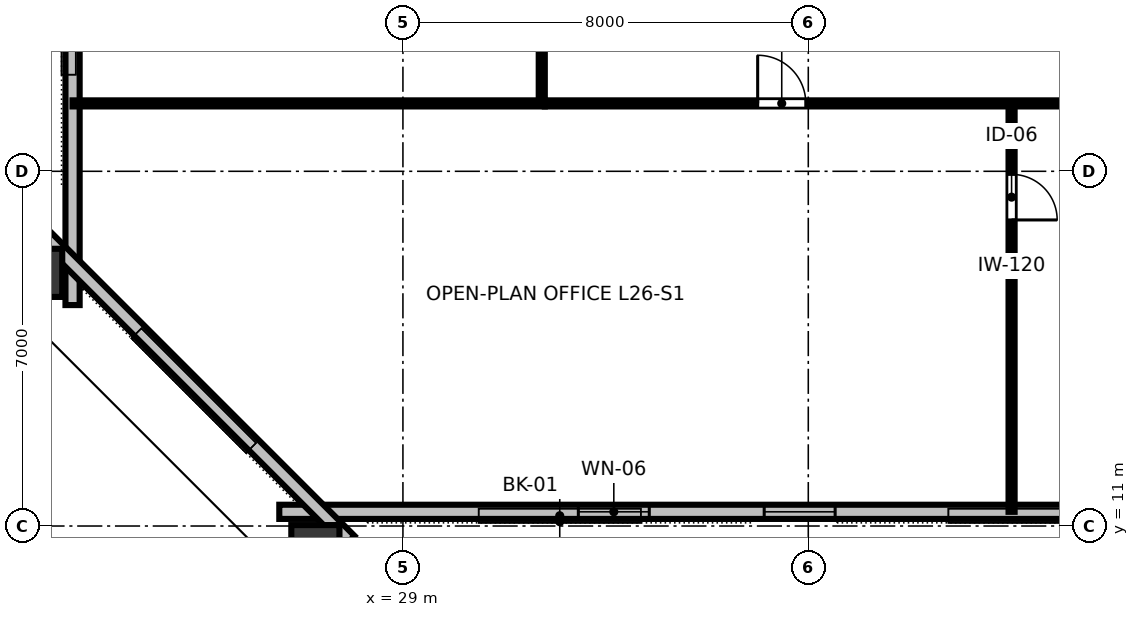
"""IFC4 building model, lengths in metres.
Left out: names, types, materials, properties, quantities, classifications, styles, units other than length and angle.
Written with IfcOpenShell. Run it as: python <this file> out.ifc"""

import sys

from ifc_helpers import new_model, si_unit, direction, frame, frame_2d, origin, origin_2d, place, context, subcontext, project, spatial, rectangle, hollow_rectangle, extrude, element, fill, save


model = new_model("IFC4")
c1 = context("Model", 3, precision=1e-05, world=origin(), true_north=direction((0.0, 1.0)))
c2 = subcontext(c1, "Body", "Model", "MODEL_VIEW")
j1 = project(units=[si_unit("LENGTHUNIT", "METRE"), si_unit("PLANEANGLEUNIT", "RADIAN")], contexts=[c1])
p1 = place(None, origin())
s1 = spatial("IfcSite", under=j1, at=p1, CompositionType="ELEMENT")
p2 = place(p1, origin())
s2 = spatial("IfcBuilding", under=s1, at=p2, CompositionType="ELEMENT")
p3 = place(p2, frame((0.0, 0.0, 102.4)))
s3 = spatial("IfcBuildingStorey", under=s2, at=p3, CompositionType="ELEMENT", Elevation=102.4)
p4 = place(p3, frame((27.272, 10.444, 0.0), z_axis=(0.227502922189, 0.158490675606, 0.960792967367), x_axis=(-0.571617951621, 0.820519906757, 0.0)))
e1 = element("IfcColumn", 1, at=p4, inside=s3, PredefinedType="COLUMN", context=c2, shape_type="SweptSolid", body=[
    extrude(hollow_rectangle(XDim=0.95, YDim=1.15, WallThickness=0.06, at=origin_2d()), origin(), (0.0, 0.0, 1.0), 3.495),
])
p5 = place(p3, frame((21.701, 15.996, 0.0), z_axis=(0.187073570433, 0.199172160222, 0.961942789275), x_axis=(-0.658567101109, -0.701158543536, 0.273250928932)))
e2 = element("IfcColumn", 2, at=p5, inside=s3, PredefinedType="COLUMN", context=c2, shape_type="SweptSolid", body=[
    extrude(hollow_rectangle(XDim=0.95, YDim=1.15, WallThickness=0.06, at=origin_2d()), origin(), (0.0, 0.0, 1.0), 3.491),
])
p6 = place(p3, frame((26.56, 11.28, 0.0), z_axis=(0.0, 0.0, 1.0), x_axis=(1.0, 0.0, 0.0)))
e3 = element("IfcWall", 3, at=p6, inside=s3, PredefinedType="STANDARD", context=c2, shape_type="SweptSolid", body=[
    extrude(rectangle(XDim=38.88, YDim=0.28, at=frame_2d((19.44, 0.0))), origin(), (0.0, 0.0, 1.0), 2.662),
])
p7 = place(p6, frame((5.902, 0.0, 0.85)))
e4 = element("IfcOpeningElement", 4, at=p7, cuts=e3, PredefinedType="OPENING", context=c2, shape_type="SweptSolid", body=[
    extrude(rectangle(XDim=1.4, YDim=1.2, at=frame_2d((0.7, 0.6))), frame((0.0, 0.15, 0.0), z_axis=(0.0, -1.0, 0.0), x_axis=(1.0, 0.0, 0.0)), (0.0, 0.0, 1.0), 0.3),
])
p8 = place(p6, frame((9.57, 0.0, 0.85)))
e5 = element("IfcOpeningElement", 5, at=p8, cuts=e3, PredefinedType="OPENING", context=c2, shape_type="SweptSolid", body=[
    extrude(rectangle(XDim=1.4, YDim=1.2, at=frame_2d((0.7, 0.6))), frame((0.0, 0.15, 0.0), z_axis=(0.0, -1.0, 0.0), x_axis=(1.0, 0.0, 0.0)), (0.0, 0.0, 1.0), 0.3),
])
p9 = place(p6, frame((16.906, 0.0, 0.85)))
e6 = element("IfcOpeningElement", 6, at=p9, cuts=e3, PredefinedType="OPENING", context=c2, shape_type="SweptSolid", body=[
    extrude(rectangle(XDim=1.4, YDim=1.2, at=frame_2d((0.7, 0.6))), frame((0.0, 0.15, 0.0), z_axis=(0.0, -1.0, 0.0), x_axis=(1.0, 0.0, 0.0)), (0.0, 0.0, 1.0), 0.3),
])
p10 = place(p6, frame((20.574, 0.0, 0.85)))
e7 = element("IfcOpeningElement", 7, at=p10, cuts=e3, PredefinedType="OPENING", context=c2, shape_type="SweptSolid", body=[
    extrude(rectangle(XDim=1.4, YDim=1.2, at=frame_2d((0.7, 0.6))), frame((0.0, 0.15, 0.0), z_axis=(0.0, -1.0, 0.0), x_axis=(1.0, 0.0, 0.0)), (0.0, 0.0, 1.0), 0.3),
])
p11 = place(p6, frame((24.242, 0.0, 0.85)))
e8 = element("IfcOpeningElement", 8, at=p11, cuts=e3, PredefinedType="OPENING", context=c2, shape_type="SweptSolid", body=[
    extrude(rectangle(XDim=1.4, YDim=1.2, at=frame_2d((0.7, 0.6))), frame((0.0, 0.15, 0.0), z_axis=(0.0, -1.0, 0.0), x_axis=(1.0, 0.0, 0.0)), (0.0, 0.0, 1.0), 0.3),
])
p12 = place(p6, frame((27.91, 0.0, 0.85)))
e9 = element("IfcOpeningElement", 9, at=p12, cuts=e3, PredefinedType="OPENING", context=c2, shape_type="SweptSolid", body=[
    extrude(rectangle(XDim=1.4, YDim=1.2, at=frame_2d((0.7, 0.6))), frame((0.0, 0.15, 0.0), z_axis=(0.0, -1.0, 0.0), x_axis=(1.0, 0.0, 0.0)), (0.0, 0.0, 1.0), 0.3),
])
p13 = place(p6, frame((31.578, 0.0, 0.85)))
e10 = element("IfcOpeningElement", 10, at=p13, cuts=e3, PredefinedType="OPENING", context=c2, shape_type="SweptSolid", body=[
    extrude(rectangle(XDim=1.4, YDim=1.2, at=frame_2d((0.7, 0.6))), frame((0.0, 0.15, 0.0), z_axis=(0.0, -1.0, 0.0), x_axis=(1.0, 0.0, 0.0)), (0.0, 0.0, 1.0), 0.3),
])
p14 = place(p3, frame((22.48, 48.64, 0.0), z_axis=(0.0, 0.0, 1.0), x_axis=(0.0, -1.0, 0.0)))
e11 = element("IfcWall", 11, at=p14, inside=s3, PredefinedType="STANDARD", context=c2, shape_type="SweptSolid", body=[
    extrude(rectangle(XDim=33.28, YDim=0.28, at=frame_2d((16.64, 0.0))), origin(), (0.0, 0.0, 1.0), 2.662),
])
p15 = place(p14, frame((6.228, 0.0, 0.85)))
e12 = element("IfcOpeningElement", 12, at=p15, cuts=e11, PredefinedType="OPENING", context=c2, shape_type="SweptSolid", body=[
    extrude(rectangle(XDim=1.4, YDim=1.2, at=frame_2d((0.7, 0.6))), frame((0.0, 0.15, 0.0), z_axis=(0.0, -1.0, 0.0), x_axis=(1.0, 0.0, 0.0)), (0.0, 0.0, 1.0), 0.3),
])
p16 = place(p14, frame((10.113, 0.0, 0.85)))
e13 = element("IfcOpeningElement", 13, at=p16, cuts=e11, PredefinedType="OPENING", context=c2, shape_type="SweptSolid", body=[
    extrude(rectangle(XDim=1.4, YDim=1.2, at=frame_2d((0.7, 0.6))), frame((0.0, 0.15, 0.0), z_axis=(0.0, -1.0, 0.0), x_axis=(1.0, 0.0, 0.0)), (0.0, 0.0, 1.0), 0.3),
])
p17 = place(p14, frame((13.998, 0.0, 0.85)))
e14 = element("IfcOpeningElement", 14, at=p17, cuts=e11, PredefinedType="OPENING", context=c2, shape_type="SweptSolid", body=[
    extrude(rectangle(XDim=1.4, YDim=1.2, at=frame_2d((0.7, 0.6))), frame((0.0, 0.15, 0.0), z_axis=(0.0, -1.0, 0.0), x_axis=(1.0, 0.0, 0.0)), (0.0, 0.0, 1.0), 0.3),
])
p18 = place(p14, frame((17.883, 0.0, 0.85)))
e15 = element("IfcOpeningElement", 15, at=p18, cuts=e11, PredefinedType="OPENING", context=c2, shape_type="SweptSolid", body=[
    extrude(rectangle(XDim=1.4, YDim=1.2, at=frame_2d((0.7, 0.6))), frame((0.0, 0.15, 0.0), z_axis=(0.0, -1.0, 0.0), x_axis=(1.0, 0.0, 0.0)), (0.0, 0.0, 1.0), 0.3),
])
p19 = place(p14, frame((21.768, 0.0, 0.85)))
e16 = element("IfcOpeningElement", 16, at=p19, cuts=e11, PredefinedType="OPENING", context=c2, shape_type="SweptSolid", body=[
    extrude(rectangle(XDim=1.4, YDim=1.2, at=frame_2d((0.7, 0.6))), frame((0.0, 0.15, 0.0), z_axis=(0.0, -1.0, 0.0), x_axis=(1.0, 0.0, 0.0)), (0.0, 0.0, 1.0), 0.3),
])
p20 = place(p14, frame((25.653, 0.0, 0.85)))
e17 = element("IfcOpeningElement", 17, at=p20, cuts=e11, PredefinedType="OPENING", context=c2, shape_type="SweptSolid", body=[
    extrude(rectangle(XDim=1.4, YDim=1.2, at=frame_2d((0.7, 0.6))), frame((0.0, 0.15, 0.0), z_axis=(0.0, -1.0, 0.0), x_axis=(1.0, 0.0, 0.0)), (0.0, 0.0, 1.0), 0.3),
])
p21 = place(p3, frame((21.906, 16.746, 0.0), z_axis=(0.0, 0.0, 1.0), x_axis=(0.707106781187, -0.707106781187, 0.0)))
e18 = element("IfcWall", 18, at=p21, inside=s3, PredefinedType="STANDARD", context=c2, shape_type="SweptSolid", body=[
    extrude(rectangle(XDim=8.541, YDim=0.28, at=frame_2d((4.271, 0.0))), origin(), (0.0, 0.0, 1.0), 2.662),
])
p22 = place(p3, frame((41.012, 19.34, 0.0), z_axis=(0.0, 0.0, 1.0), x_axis=(0.0, -1.0, 0.0)))
e19 = element("IfcWall", 19, at=p22, inside=s3, PredefinedType="PARTITIONING", context=c2, shape_type="SweptSolid", body=[
    extrude(rectangle(XDim=8.06, YDim=0.12, at=frame_2d((4.03, 0.0))), origin(), (0.0, 0.0, 1.0), 2.64),
])
p23 = place(p22, frame((1.4, 0.0, 0.0)))
e20 = element("IfcOpeningElement", 20, at=p23, cuts=e19, PredefinedType="OPENING", context=c2, shape_type="SweptSolid", body=[
    extrude(rectangle(XDim=0.9, YDim=2.15, at=frame_2d((0.45, 1.075))), frame((0.0, 0.07, 0.0), z_axis=(0.0, -1.0, 0.0), x_axis=(1.0, 0.0, 0.0)), (0.0, 0.0, 1.0), 0.14),
])
p24 = place(p3, frame((31.8, 19.34, 0.0), z_axis=(0.0, 0.0, 1.0), x_axis=(1.0, 0.0, 0.0)))
e21 = element("IfcWall", 21, at=p24, inside=s3, PredefinedType="PARTITIONING", context=c2, shape_type="SweptSolid", body=[
    extrude(rectangle(XDim=28.4, YDim=0.12, at=frame_2d((14.2, 0.0))), origin(), (0.0, 0.0, 1.0), 2.64),
])
p25 = place(p24, frame((4.201, 0.0, 0.0)))
e22 = element("IfcOpeningElement", 22, at=p25, cuts=e21, PredefinedType="OPENING", context=c2, shape_type="SweptSolid", body=[
    extrude(rectangle(XDim=0.95, YDim=2.15, at=frame_2d((0.475, 1.075))), frame((0.0, 0.07, 0.0), z_axis=(0.0, -1.0, 0.0), x_axis=(1.0, 0.0, 0.0)), (0.0, 0.0, 1.0), 0.14),
])
p26 = place(p24, frame((11.29, 0.0, 0.0)))
e23 = element("IfcOpeningElement", 23, at=p26, cuts=e21, PredefinedType="OPENING", context=c2, shape_type="SweptSolid", body=[
    extrude(rectangle(XDim=0.95, YDim=2.15, at=frame_2d((0.475, 1.075))), frame((0.0, 0.07, 0.0), z_axis=(0.0, -1.0, 0.0), x_axis=(1.0, 0.0, 0.0)), (0.0, 0.0, 1.0), 0.14),
])
p27 = place(p24, frame((17.423, 0.0, 0.0)))
e24 = element("IfcOpeningElement", 24, at=p27, cuts=e21, PredefinedType="OPENING", context=c2, shape_type="SweptSolid", body=[
    extrude(rectangle(XDim=0.95, YDim=2.15, at=frame_2d((0.475, 1.075))), frame((0.0, 0.07, 0.0), z_axis=(0.0, -1.0, 0.0), x_axis=(1.0, 0.0, 0.0)), (0.0, 0.0, 1.0), 0.14),
])
p28 = place(p24, frame((24.394, 0.0, 0.0)))
e25 = element("IfcOpeningElement", 25, at=p28, cuts=e21, PredefinedType="OPENING", context=c2, shape_type="SweptSolid", body=[
    extrude(rectangle(XDim=0.95, YDim=2.15, at=frame_2d((0.475, 1.075))), frame((0.0, 0.07, 0.0), z_axis=(0.0, -1.0, 0.0), x_axis=(1.0, 0.0, 0.0)), (0.0, 0.0, 1.0), 0.14),
])
p29 = place(p3, frame((31.74, 19.4, 0.0), z_axis=(0.0, 0.0, 1.0), x_axis=(0.0, 1.0, 0.0)))
e26 = element("IfcWall", 26, at=p29, inside=s3, PredefinedType="PARTITIONING", context=c2, shape_type="SweptSolid", body=[
    extrude(rectangle(XDim=11.58, YDim=0.12, at=frame_2d((5.79, 0.0))), origin(), (0.0, 0.0, 1.0), 2.64),
])
p30 = place(p29, frame((5.415, 0.0, 0.0)))
e27 = element("IfcOpeningElement", 27, at=p30, cuts=e26, PredefinedType="OPENING", context=c2, shape_type="SweptSolid", body=[
    extrude(rectangle(XDim=0.95, YDim=2.15, at=frame_2d((0.475, 1.075))), frame((0.0, 0.07, 0.0), z_axis=(0.0, -1.0, 0.0), x_axis=(1.0, 0.0, 0.0)), (0.0, 0.0, 1.0), 0.14),
])
p31 = place(p3, frame((31.8, 19.34, 0.0), z_axis=(0.0, 0.0, 1.0), x_axis=(-1.0, 0.0, 0.0)))
e28 = element("IfcWall", 28, at=p31, inside=s3, PredefinedType="PARTITIONING", context=c2, shape_type="SweptSolid", body=[
    extrude(rectangle(XDim=9.32, YDim=0.12, at=frame_2d((4.66, 0.0))), origin(), (0.0, 0.0, 1.0), 2.64),
])
p32 = place(p7, origin())
e29 = element("IfcWindow", 29, at=p32, inside=s3, PartitioningType="SINGLE_PANEL", PredefinedType="WINDOW", context=c2, shape_type="SweptSolid", body=[
    extrude(rectangle(XDim=1.4, YDim=1.2, at=frame_2d((0.7, 0.6))), frame((0.0, 0.03, 0.0), z_axis=(0.0, -1.0, 0.0), x_axis=(1.0, 0.0, 0.0)), (0.0, 0.0, 1.0), 0.06),
])
fill(e4, e29)
p33 = place(p8, origin())
e30 = element("IfcWindow", 30, at=p33, inside=s3, PartitioningType="SINGLE_PANEL", PredefinedType="WINDOW", context=c2, shape_type="SweptSolid", body=[
    extrude(rectangle(XDim=1.4, YDim=1.2, at=frame_2d((0.7, 0.6))), frame((0.0, 0.03, 0.0), z_axis=(0.0, -1.0, 0.0), x_axis=(1.0, 0.0, 0.0)), (0.0, 0.0, 1.0), 0.06),
])
fill(e5, e30)
p34 = place(p23, origin())
e31 = element("IfcDoor", 31, at=p34, inside=s3, OperationType="SINGLE_SWING_RIGHT", PredefinedType="DOOR", context=c2, shape_type="SweptSolid", body=[
    extrude(rectangle(XDim=0.9, YDim=2.15, at=frame_2d((0.45, 1.075))), frame((0.0, 0.025, 0.0), z_axis=(0.0, -1.0, 0.0), x_axis=(1.0, 0.0, 0.0)), (0.0, 0.0, 1.0), 0.05),
])
fill(e20, e31)
p35 = place(p25, origin())
e32 = element("IfcDoor", 32, at=p35, inside=s3, OperationType="SINGLE_SWING_LEFT", PredefinedType="DOOR", context=c2, shape_type="SweptSolid", body=[
    extrude(rectangle(XDim=0.95, YDim=2.15, at=frame_2d((0.475, 1.075))), frame((0.0, 0.025, 0.0), z_axis=(0.0, -1.0, 0.0), x_axis=(1.0, 0.0, 0.0)), (0.0, 0.0, 1.0), 0.05),
])
fill(e22, e32)
save(model, sys.argv[1])
